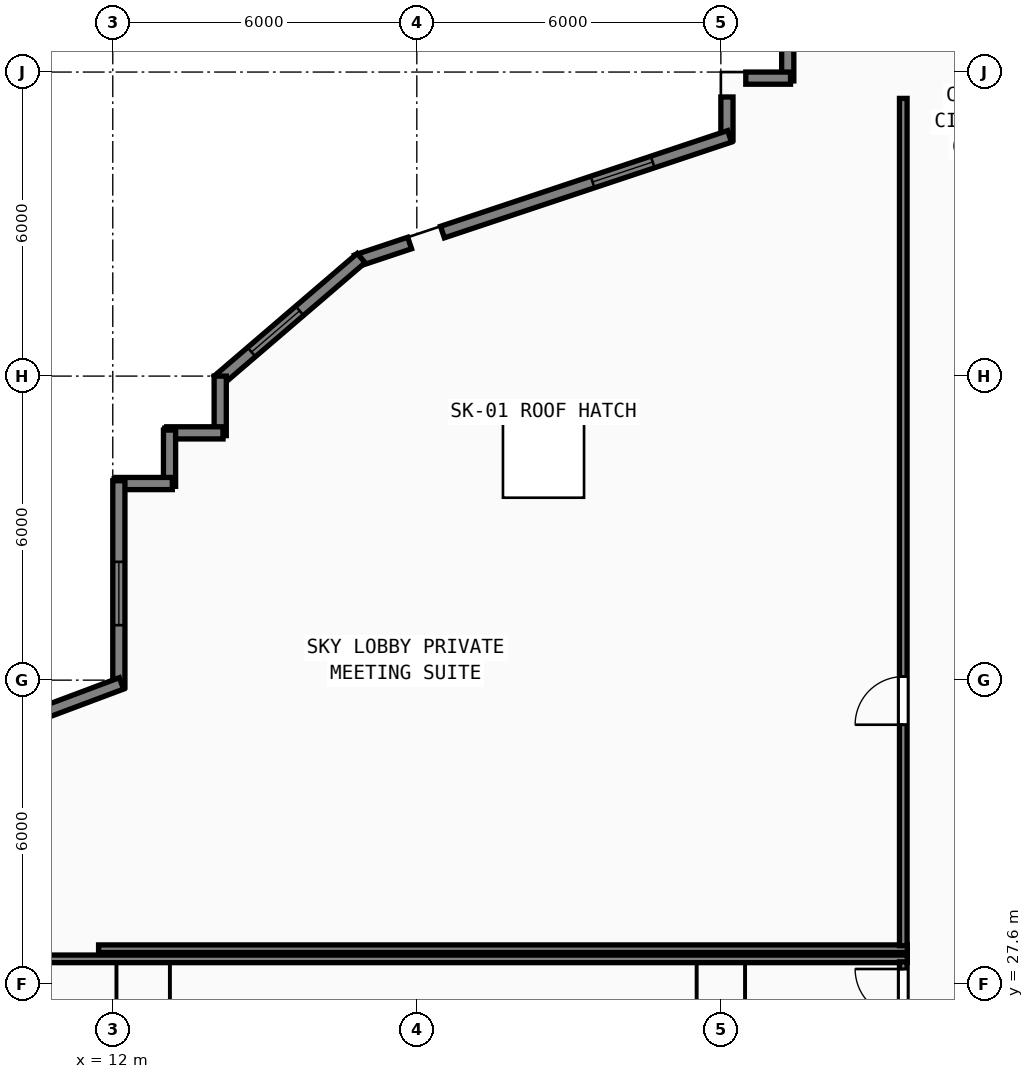
"""IFC4 building model, lengths in metres.
Left out: names, types, materials, properties, quantities, classifications, styles, units other than length and angle.
Written with IfcOpenShell. Run it as: python <this file> out.ifc"""

import sys

from ifc_helpers import new_model, si_unit, direction, frame, frame_2d, origin, origin_2d, place, context, subcontext, project, spatial, rectangle, hollow_rectangle, extrude, element, fill, save


model = new_model("IFC4")
c1 = context("Model", 3, precision=1e-05, world=origin(), true_north=direction((0.0, 1.0)))
c2 = subcontext(c1, "Body", "Model", "MODEL_VIEW")
j1 = project(units=[si_unit("LENGTHUNIT", "METRE"), si_unit("PLANEANGLEUNIT", "RADIAN")], contexts=[c1])
p1 = place(None, origin())
s1 = spatial("IfcSite", under=j1, at=p1, CompositionType="ELEMENT")
p2 = place(p1, origin())
s2 = spatial("IfcBuilding", under=s1, at=p2, CompositionType="ELEMENT")
p3 = place(p2, frame((0.0, 0.0, 94.0)))
s3 = spatial("IfcBuildingStorey", under=s2, at=p3, CompositionType="ELEMENT", Elevation=94.0)
for number, where, z_axis, x_axis in (
    (1, (24.0, 33.6, 0.0), (0.0, 0.0, 1.0), (1.0, 0.0, 0.0)),
    (2, (24.0, 45.6, 0.0), (0.0, 0.0, 1.0), (1.0, 0.0, 0.0)),
    (3, (12.6, 27.6, 0.0), (0.0, 0.0, 1.0), (1.0, 0.0, 0.0)),
):
    element("IfcColumn", number, at=place(p3, frame(where, z_axis=z_axis, x_axis=x_axis)), inside=s3, PredefinedType="COLUMN", context=c2, shape_type="SweptSolid", body=[
        extrude(hollow_rectangle(XDim=1.0, YDim=1.0, WallThickness=0.038, at=origin_2d()), origin(), (0.0, 0.0, 1.0), 4.4),
    ])
for number, where, z_axis, x_axis in (
    (4, (24.0, 27.6, 0.0), (0.0, 0.0, 1.0), (1.0, 0.0, 0.0)),
    (5, (24.0, 39.6, 0.0), (0.0, 0.0, 1.0), (1.0, 0.0, 0.0)),
    (6, (18.3, 42.0, 0.0), (0.0, 0.0, 1.0), (1.0, 0.0, 0.0)),
):
    element("IfcColumn", number, at=place(p3, frame(where, z_axis=z_axis, x_axis=x_axis)), inside=s3, PredefinedType="COLUMN", context=c2, shape_type="SweptSolid", body=[
        extrude(hollow_rectangle(XDim=0.9, YDim=0.9, WallThickness=0.034, at=origin_2d()), origin(), (0.0, 0.0, 1.0), 4.4),
    ])
p4 = place(p3, frame((25.32, 46.735, 0.0), z_axis=(0.0, 0.0, 1.0), x_axis=(0.0, -1.0, 0.0)))
e7 = element("IfcWall", 7, at=p4, inside=s3, PredefinedType="SOLIDWALL", context=c2, shape_type="SweptSolid", body=[
    extrude(rectangle(XDim=1.31, YDim=0.24, at=frame_2d((0.655, 0.0))), origin(), (0.0, 0.0, 1.0), 4.2),
])
p5 = place(p3, frame((25.375, 45.48, 0.0), z_axis=(0.0, 0.0, 1.0), x_axis=(-1.0, 0.0, 0.0)))
e8 = element("IfcWall", 8, at=p5, inside=s3, PredefinedType="SOLIDWALL", context=c2, shape_type="SweptSolid", body=[
    extrude(rectangle(XDim=0.883, YDim=0.24, at=frame_2d((0.441, 0.0))), origin(), (0.0, 0.0, 1.0), 4.2),
])
p6 = place(p3, frame((24.12, 45.108, 0.0), z_axis=(0.0, 0.0, 1.0), x_axis=(0.0, -1.0, 0.0)))
e9 = element("IfcWall", 9, at=p6, inside=s3, PredefinedType="SOLIDWALL", context=c2, shape_type="SweptSolid", body=[
    extrude(rectangle(XDim=0.849, YDim=0.24, at=frame_2d((0.425, 0.0))), origin(), (0.0, 0.0, 1.0), 3.745),
])
p7 = place(p3, frame((24.172, 44.331, 0.0), z_axis=(0.0, 0.0, 1.0), x_axis=(-0.948683298051, -0.316227766017, 0.0)))
e10 = element("IfcWall", 10, at=p7, inside=s3, PredefinedType="SOLIDWALL", context=c2, shape_type="SweptSolid", body=[
    extrude(rectangle(XDim=5.973, YDim=0.24, at=frame_2d((2.987, 0.0))), origin(), (0.0, 0.0, 1.0), 3.745),
])
p8 = place(p7, frame((1.6, 0.0, 0.85)))
e11 = element("IfcOpeningElement", 11, at=p8, cuts=e10, PredefinedType="OPENING", context=c2, shape_type="SweptSolid", body=[
    extrude(rectangle(XDim=1.25, YDim=1.95, at=frame_2d((0.625, 0.975))), frame((0.0, 0.13, 0.0), z_axis=(0.0, -1.0, 0.0), x_axis=(1.0, 0.0, 0.0)), (0.0, 0.0, 1.0), 0.26),
])
p9 = place(p3, frame((17.858, 42.226, 0.0), z_axis=(0.0, 0.0, 1.0), x_axis=(-0.948639166064, -0.316360131194, 0.0)))
e12 = element("IfcWall", 12, at=p9, inside=s3, PredefinedType="SOLIDWALL", context=c2, shape_type="SweptSolid", body=[
    extrude(rectangle(XDim=1.107, YDim=0.24, at=frame_2d((0.553, 0.0))), origin(), (0.0, 0.0, 1.0), 4.2),
])
p10 = place(p3, frame((16.902, 41.929, 0.0), z_axis=(0.0, 0.0, 1.0), x_axis=(-0.759275136126, -0.650769750112, 0.0)))
e13 = element("IfcWall", 13, at=p10, inside=s3, PredefinedType="SOLIDWALL", context=c2, shape_type="SweptSolid", body=[
    extrude(rectangle(XDim=3.719, YDim=0.24, at=frame_2d((1.86, 0.0))), origin(), (0.0, 0.0, 1.0), 4.2),
])
p11 = place(p10, frame((1.6, 0.0, 0.85)))
e14 = element("IfcOpeningElement", 14, at=p11, cuts=e13, PredefinedType="OPENING", context=c2, shape_type="SweptSolid", body=[
    extrude(rectangle(XDim=1.25, YDim=1.95, at=frame_2d((0.625, 0.975))), frame((0.0, 0.13, 0.0), z_axis=(0.0, -1.0, 0.0), x_axis=(1.0, 0.0, 0.0)), (0.0, 0.0, 1.0), 0.26),
])
p12 = place(p3, frame((14.12, 39.6, 0.0), z_axis=(0.0, 0.0, 1.0), x_axis=(0.0, -1.0, 0.0)))
e15 = element("IfcWall", 15, at=p12, inside=s3, PredefinedType="SOLIDWALL", context=c2, shape_type="SweptSolid", body=[
    extrude(rectangle(XDim=1.175, YDim=0.24, at=frame_2d((0.587, 0.0))), origin(), (0.0, 0.0, 1.0), 4.2),
])
p13 = place(p3, frame((14.175, 38.48, 0.0), z_axis=(0.0, 0.0, 1.0), x_axis=(-1.0, 0.0, 0.0)))
e16 = element("IfcWall", 16, at=p13, inside=s3, PredefinedType="SOLIDWALL", context=c2, shape_type="SweptSolid", body=[
    extrude(rectangle(XDim=1.11, YDim=0.24, at=frame_2d((0.555, 0.0))), origin(), (0.0, 0.0, 1.0), 4.2),
])
p14 = place(p3, frame((13.12, 38.535, 0.0), z_axis=(0.0, 0.0, 1.0), x_axis=(0.0, -1.0, 0.0)))
e17 = element("IfcWall", 17, at=p14, inside=s3, PredefinedType="SOLIDWALL", context=c2, shape_type="SweptSolid", body=[
    extrude(rectangle(XDim=1.11, YDim=0.24, at=frame_2d((0.555, 0.0))), origin(), (0.0, 0.0, 1.0), 4.2),
])
p15 = place(p3, frame((13.175, 37.48, 0.0), z_axis=(0.0, 0.0, 1.0), x_axis=(-1.0, 0.0, 0.0)))
e18 = element("IfcWall", 18, at=p15, inside=s3, PredefinedType="SOLIDWALL", context=c2, shape_type="SweptSolid", body=[
    extrude(rectangle(XDim=1.11, YDim=0.24, at=frame_2d((0.555, 0.0))), origin(), (0.0, 0.0, 1.0), 4.2),
])
p16 = place(p3, frame((12.12, 37.535, 0.0), z_axis=(0.0, 0.0, 1.0), x_axis=(0.0, -1.0, 0.0)))
e19 = element("IfcWall", 19, at=p16, inside=s3, PredefinedType="SOLIDWALL", context=c2, shape_type="SweptSolid", body=[
    extrude(rectangle(XDim=4.073, YDim=0.24, at=frame_2d((2.037, 0.0))), origin(), (0.0, 0.0, 1.0), 4.2),
])
p17 = place(p16, frame((1.6, 0.0, 0.85)))
e20 = element("IfcOpeningElement", 20, at=p17, cuts=e19, PredefinedType="OPENING", context=c2, shape_type="SweptSolid", body=[
    extrude(rectangle(XDim=1.25, YDim=1.95, at=frame_2d((0.625, 0.975))), frame((0.0, 0.13, 0.0), z_axis=(0.0, -1.0, 0.0), x_axis=(1.0, 0.0, 0.0)), (0.0, 0.0, 1.0), 0.26),
])
p18 = place(p3, frame((12.171, 33.536, 0.0), z_axis=(0.0, 0.0, 1.0), x_axis=(-0.936327744176, -0.351127263946, 0.0)))
e21 = element("IfcWall", 21, at=p18, inside=s3, PredefinedType="SOLIDWALL", context=c2, shape_type="SweptSolid", body=[
    extrude(rectangle(XDim=7.0, YDim=0.24, at=frame_2d((3.5, 0.0))), origin(), (0.0, 0.0, 1.0), 4.2),
])
p19 = place(p18, frame((1.6, 0.0, 0.85)))
e22 = element("IfcOpeningElement", 22, at=p19, cuts=e21, PredefinedType="OPENING", context=c2, shape_type="SweptSolid", body=[
    extrude(rectangle(XDim=1.25, YDim=1.95, at=frame_2d((0.625, 0.975))), frame((0.0, 0.13, 0.0), z_axis=(0.0, -1.0, 0.0), x_axis=(1.0, 0.0, 0.0)), (0.0, 0.0, 1.0), 0.26),
])
p20 = place(p3, frame((3.625, 28.1, 0.0), z_axis=(0.0, 0.0, 1.0), x_axis=(1.0, 0.0, 0.0)))
e23 = element("IfcWall", 23, at=p20, inside=s3, PredefinedType="PARTITIONING", context=c2, shape_type="SweptSolid", body=[
    extrude(rectangle(XDim=24.055, YDim=0.15, at=frame_2d((12.027, 0.0))), origin(), (0.0, 0.0, 1.0), 4.2),
])
p21 = place(p3, frame((27.6, 24.36, 0.0), z_axis=(0.0, 0.0, 1.0), x_axis=(0.0, 1.0, 0.0)))
e24 = element("IfcWall", 24, at=p21, inside=s3, PredefinedType="PARTITIONING", context=c2, shape_type="SweptSolid", body=[
    extrude(rectangle(XDim=3.68, YDim=0.15, at=frame_2d((1.84, 0.0))), origin(), (0.0, 0.0, 1.0), 4.2),
])
p22 = place(p21, frame((3.54, 0.0, 0.0), z_axis=(0.0, 0.0, 1.0), x_axis=(-1.0, 0.0, 0.0)))
e25 = element("IfcOpeningElement", 25, at=p22, cuts=e24, PredefinedType="OPENING", context=c2, shape_type="SweptSolid", body=[
    extrude(rectangle(XDim=0.95, YDim=2.12, at=frame_2d((0.475, 1.06))), frame((0.0, 0.085, 0.0), z_axis=(0.0, -1.0, 0.0), x_axis=(1.0, 0.0, 0.0)), (0.0, 0.0, 1.0), 0.17),
])
p23 = place(p3, frame((11.72, 28.3, 0.0), z_axis=(0.0, 0.0, 1.0), x_axis=(1.0, 0.0, 0.0)))
e26 = element("IfcWall", 26, at=p23, inside=s3, PredefinedType="PARTITIONING", context=c2, shape_type="SweptSolid", body=[
    extrude(rectangle(XDim=15.96, YDim=0.15, at=frame_2d((7.98, 0.0))), origin(), (0.0, 0.0, 1.0), 4.2),
])
p24 = place(p3, frame((27.6, 28.36, 0.0), z_axis=(0.0, 0.0, 1.0), x_axis=(0.0, 1.0, 0.0)))
e27 = element("IfcWall", 27, at=p24, inside=s3, PredefinedType="PARTITIONING", context=c2, shape_type="SweptSolid", body=[
    extrude(rectangle(XDim=16.72, YDim=0.15, at=frame_2d((8.36, 0.0))), origin(), (0.0, 0.0, 1.0), 4.2),
])
p25 = place(p24, frame((5.31, 0.0, 0.0), z_axis=(0.0, 0.0, 1.0), x_axis=(-1.0, 0.0, 0.0)))
e28 = element("IfcOpeningElement", 28, at=p25, cuts=e27, PredefinedType="OPENING", context=c2, shape_type="SweptSolid", body=[
    extrude(rectangle(XDim=0.95, YDim=2.12, at=frame_2d((0.475, 1.06))), frame((0.0, 0.085, 0.0), z_axis=(0.0, -1.0, 0.0), x_axis=(1.0, 0.0, 0.0)), (0.0, 0.0, 1.0), 0.17),
])
p26 = place(p8, origin())
e29 = element("IfcWindow", 29, at=p26, inside=s3, PartitioningType="SINGLE_PANEL", PredefinedType="WINDOW", context=c2, shape_type="SweptSolid", body=[
    extrude(rectangle(XDim=1.25, YDim=1.95, at=frame_2d((0.625, 0.975))), frame((0.0, 0.03, 0.0), z_axis=(0.0, -1.0, 0.0), x_axis=(1.0, 0.0, 0.0)), (0.0, 0.0, 1.0), 0.06),
])
fill(e11, e29)
p27 = place(p11, origin())
e30 = element("IfcWindow", 30, at=p27, inside=s3, PartitioningType="SINGLE_PANEL", PredefinedType="WINDOW", context=c2, shape_type="SweptSolid", body=[
    extrude(rectangle(XDim=1.25, YDim=1.95, at=frame_2d((0.625, 0.975))), frame((0.0, 0.03, 0.0), z_axis=(0.0, -1.0, 0.0), x_axis=(1.0, 0.0, 0.0)), (0.0, 0.0, 1.0), 0.06),
])
fill(e14, e30)
p28 = place(p17, origin())
e31 = element("IfcWindow", 31, at=p28, inside=s3, PartitioningType="SINGLE_PANEL", PredefinedType="WINDOW", context=c2, shape_type="SweptSolid", body=[
    extrude(rectangle(XDim=1.25, YDim=1.95, at=frame_2d((0.625, 0.975))), frame((0.0, 0.03, 0.0), z_axis=(0.0, -1.0, 0.0), x_axis=(1.0, 0.0, 0.0)), (0.0, 0.0, 1.0), 0.06),
])
fill(e20, e31)
p29 = place(p3, frame((0.0, 0.0, -0.25)))
p30 = place(p29, frame((20.5, 38.0, 0.0)))
p31 = place(p30, frame((0.0, 0.0, 0.2)))
e32 = element("IfcWindow", 32, at=p31, inside=s3, PartitioningType="SINGLE_PANEL", PredefinedType="SKYLIGHT", context=c2, shape_type="SweptSolid", body=[
    extrude(rectangle(XDim=1.6, YDim=1.6, at=origin_2d()), origin(), (0.0, 0.0, 1.0), 0.05),
])
p32 = place(p22, origin())
e33 = element("IfcDoor", 33, at=p32, inside=s3, OperationType="SINGLE_SWING_LEFT", PredefinedType="DOOR", context=c2, shape_type="SweptSolid", body=[
    extrude(rectangle(XDim=0.95, YDim=2.12, at=frame_2d((0.475, 1.06))), frame((0.0, 0.025, 0.0), z_axis=(0.0, -1.0, 0.0), x_axis=(1.0, 0.0, 0.0)), (0.0, 0.0, 1.0), 0.05),
])
fill(e25, e33)
p33 = place(p25, origin())
e34 = element("IfcDoor", 34, at=p33, inside=s3, OperationType="SINGLE_SWING_RIGHT", PredefinedType="DOOR", context=c2, shape_type="SweptSolid", body=[
    extrude(rectangle(XDim=0.95, YDim=2.12, at=frame_2d((0.475, 1.06))), frame((0.0, 0.025, 0.0), z_axis=(0.0, -1.0, 0.0), x_axis=(1.0, 0.0, 0.0)), (0.0, 0.0, 1.0), 0.05),
])
fill(e28, e34)
save(model, sys.argv[1])
